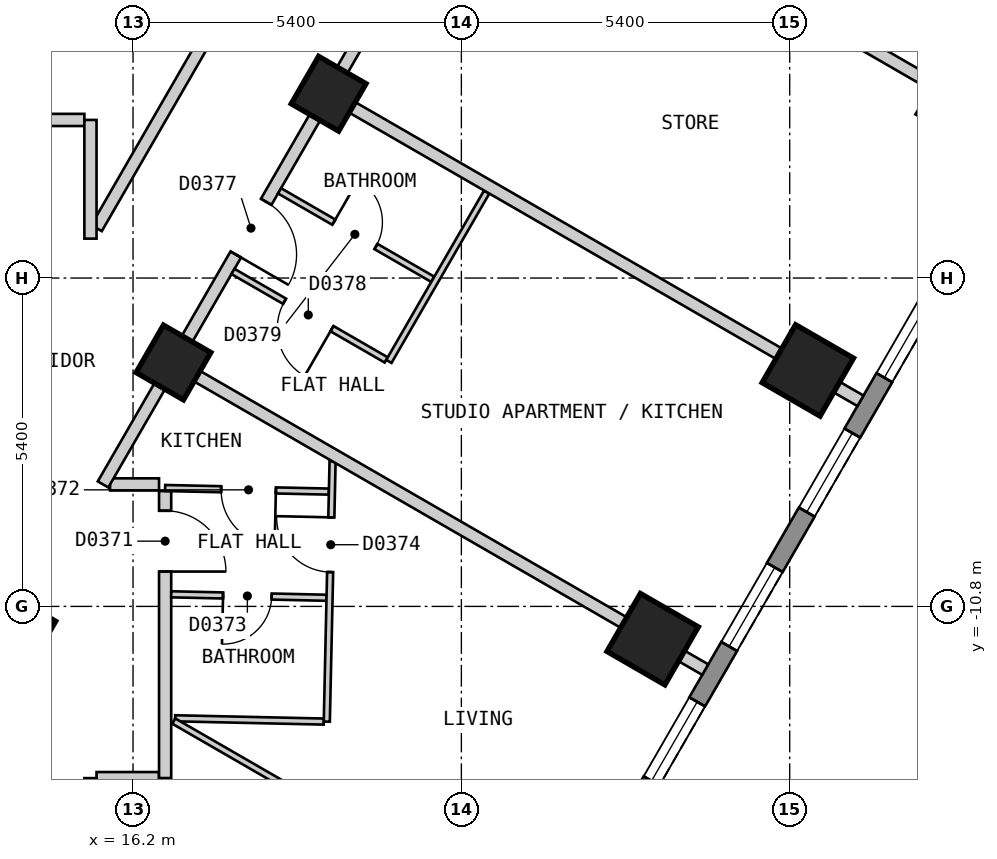
"""IFC4 building model, lengths in metres.
Left out: names, types, materials, properties, quantities, classifications, styles, units other than length and angle.
Written with IfcOpenShell. Run it as: python <this file> out.ifc"""

import sys

from ifc_helpers import new_model, si_unit, direction, frame, frame_2d, origin, origin_2d, place, context, subcontext, project, spatial, polyline, rectangle, outline, extrude, element, fill, save


model = new_model("IFC4")
c1 = context("Model", 3, precision=1e-05, world=origin(), true_north=direction((0.0, 1.0)))
c2 = subcontext(c1, "Body", "Model", "MODEL_VIEW")
j1 = project(units=[si_unit("LENGTHUNIT", "METRE"), si_unit("PLANEANGLEUNIT", "RADIAN")], contexts=[c1])
p1 = place(None, origin())
s1 = spatial("IfcSite", under=j1, at=p1, CompositionType="ELEMENT")
p2 = place(p1, origin())
s2 = spatial("IfcBuilding", under=s1, at=p2, CompositionType="ELEMENT")
p3 = place(p2, frame((0.0, 0.0, 59.4)))
s3 = spatial("IfcBuildingStorey", under=s2, at=p3, CompositionType="ELEMENT", Elevation=59.4)
for number, where, z_axis, x_axis in (
    (1, (24.746, -11.339, 0.0), (0.0, 0.0, 1.0), (0.5, 0.866, 0.0)),
    (2, (27.298, -6.919, 0.0), (0.0, 0.0, 1.0), (0.5, 0.866, 0.0)),
    (3, (29.849, -2.499, 0.0), (0.0, 0.0, 1.0), (0.5, 0.866, 0.0)),
):
    element("IfcColumn", number, at=place(p3, frame(where, z_axis=z_axis, x_axis=x_axis)), inside=s3, PredefinedType="COLUMN", context=c2, shape_type="SweptSolid", body=[
        extrude(rectangle(XDim=1.1, YDim=1.1, at=origin_2d()), origin(), (0.0, 0.0, 1.0), 3.0),
    ])
for number, where, z_axis, x_axis in (
    (4, (14.313, -11.209, 0.0), (0.0, 0.0, 1.0), (0.5, 0.866, 0.0)),
    (5, (16.865, -6.789, 0.0), (0.0, 0.0, 1.0), (0.5, 0.866, 0.0)),
    (6, (19.417, -2.369, 0.0), (0.0, 0.0, 1.0), (0.5, 0.866, 0.0)),
):
    element("IfcColumn", number, at=place(p3, frame(where, z_axis=z_axis, x_axis=x_axis)), inside=s3, PredefinedType="COLUMN", context=c2, shape_type="SweptSolid", body=[
        extrude(rectangle(XDim=0.9, YDim=0.9, at=origin_2d()), origin(), (0.0, 0.0, 1.0), 3.0),
    ])
p4 = place(p3, frame((17.71, -25.825, 0.0), z_axis=(0.0, 0.0, 1.0), x_axis=(0.500001938803, 0.866024284413, 0.0)))
e7 = element("IfcWall", 7, at=p4, inside=s3, PredefinedType="SOLIDWALL", context=c2, shape_type="SweptSolid", body=[
    extrude(outline(polyline([(0.0, -0.15), (27.02, -0.15), (26.94, 0.15), (0.08, 0.15), (0.0, -0.15)])), origin(), (0.0, 0.0, 1.0), 2.6),
])
p5 = place(p4, frame((1.277, 0.0, 0.15)))
e8 = element("IfcOpeningElement", 8, at=p5, cuts=e7, PredefinedType="OPENING", context=c2, shape_type="SweptSolid", body=[
    extrude(rectangle(XDim=1.5, YDim=2.1, at=frame_2d((0.75, 1.05))), frame((0.0, 0.16, 0.0), z_axis=(0.0, -1.0, 0.0), x_axis=(1.0, 0.0, 0.0)), (0.0, 0.0, 1.0), 0.32),
])
p6 = place(p4, frame((3.829, 0.0, 0.15)))
e9 = element("IfcOpeningElement", 9, at=p6, cuts=e7, PredefinedType="OPENING", context=c2, shape_type="SweptSolid", body=[
    extrude(rectangle(XDim=1.5, YDim=2.1, at=frame_2d((0.75, 1.05))), frame((0.0, 0.16, 0.0), z_axis=(0.0, -1.0, 0.0), x_axis=(1.0, 0.0, 0.0)), (0.0, 0.0, 1.0), 0.32),
])
p7 = place(p4, frame((6.382, 0.0, 0.15)))
e10 = element("IfcOpeningElement", 10, at=p7, cuts=e7, PredefinedType="OPENING", context=c2, shape_type="SweptSolid", body=[
    extrude(rectangle(XDim=1.5, YDim=2.1, at=frame_2d((0.75, 1.05))), frame((0.0, 0.16, 0.0), z_axis=(0.0, -1.0, 0.0), x_axis=(1.0, 0.0, 0.0)), (0.0, 0.0, 1.0), 0.32),
])
p8 = place(p4, frame((8.933, 0.0, 0.15)))
e11 = element("IfcOpeningElement", 11, at=p8, cuts=e7, PredefinedType="OPENING", context=c2, shape_type="SweptSolid", body=[
    extrude(rectangle(XDim=1.5, YDim=2.1, at=frame_2d((0.75, 1.05))), frame((0.0, 0.16, 0.0), z_axis=(0.0, -1.0, 0.0), x_axis=(1.0, 0.0, 0.0)), (0.0, 0.0, 1.0), 0.32),
])
p9 = place(p4, frame((11.485, 0.0, 0.15)))
e12 = element("IfcOpeningElement", 12, at=p9, cuts=e7, PredefinedType="OPENING", context=c2, shape_type="SweptSolid", body=[
    extrude(rectangle(XDim=1.5, YDim=2.1, at=frame_2d((0.75, 1.05))), frame((0.0, 0.16, 0.0), z_axis=(0.0, -1.0, 0.0), x_axis=(1.0, 0.0, 0.0)), (0.0, 0.0, 1.0), 0.32),
])
p10 = place(p4, frame((14.037, 0.0, 0.15)))
e13 = element("IfcOpeningElement", 13, at=p10, cuts=e7, PredefinedType="OPENING", context=c2, shape_type="SweptSolid", body=[
    extrude(rectangle(XDim=1.5, YDim=2.1, at=frame_2d((0.75, 1.05))), frame((0.0, 0.16, 0.0), z_axis=(0.0, -1.0, 0.0), x_axis=(1.0, 0.0, 0.0)), (0.0, 0.0, 1.0), 0.32),
])
p11 = place(p4, frame((16.589, 0.0, 0.15)))
e14 = element("IfcOpeningElement", 14, at=p11, cuts=e7, PredefinedType="OPENING", context=c2, shape_type="SweptSolid", body=[
    extrude(rectangle(XDim=1.5, YDim=2.1, at=frame_2d((0.75, 1.05))), frame((0.0, 0.16, 0.0), z_axis=(0.0, -1.0, 0.0), x_axis=(1.0, 0.0, 0.0)), (0.0, 0.0, 1.0), 0.32),
])
p12 = place(p4, frame((19.141, 0.0, 0.15)))
e15 = element("IfcOpeningElement", 15, at=p12, cuts=e7, PredefinedType="OPENING", context=c2, shape_type="SweptSolid", body=[
    extrude(rectangle(XDim=1.5, YDim=2.1, at=frame_2d((0.75, 1.05))), frame((0.0, 0.16, 0.0), z_axis=(0.0, -1.0, 0.0), x_axis=(1.0, 0.0, 0.0)), (0.0, 0.0, 1.0), 0.32),
])
p13 = place(p4, frame((21.693, 0.0, 0.15)))
e16 = element("IfcOpeningElement", 16, at=p13, cuts=e7, PredefinedType="OPENING", context=c2, shape_type="SweptSolid", body=[
    extrude(rectangle(XDim=1.5, YDim=2.1, at=frame_2d((0.75, 1.05))), frame((0.0, 0.16, 0.0), z_axis=(0.0, -1.0, 0.0), x_axis=(1.0, 0.0, 0.0)), (0.0, 0.0, 1.0), 0.32),
])
p14 = place(p4, frame((24.244, 0.0, 0.15)))
e17 = element("IfcOpeningElement", 17, at=p14, cuts=e7, PredefinedType="OPENING", context=c2, shape_type="SweptSolid", body=[
    extrude(rectangle(XDim=1.5, YDim=2.1, at=frame_2d((0.75, 1.05))), frame((0.0, 0.16, 0.0), z_axis=(0.0, -1.0, 0.0), x_axis=(1.0, 0.0, 0.0)), (0.0, 0.0, 1.0), 0.32),
])
p15 = place(p3, frame((15.822, -8.794, 0.0), z_axis=(0.0, 0.0, 1.0), x_axis=(1.0, 0.0, 0.0)))
e18 = element("IfcWall", 18, at=p15, inside=s3, PredefinedType="PARTITIONING", context=c2, shape_type="SweptSolid", body=[
    extrude(rectangle(XDim=0.806, YDim=0.2, at=frame_2d((0.403, 0.0))), origin(), (0.0, 0.0, 1.0), 2.6),
])
p16 = place(p3, frame((15.6, -13.624, 0.0), z_axis=(0.0, 0.0, 1.0), x_axis=(1.0, 0.0, 0.0)))
e19 = element("IfcWall", 19, at=p16, inside=s3, PredefinedType="PARTITIONING", context=c2, shape_type="SweptSolid", body=[
    extrude(rectangle(XDim=1.027, YDim=0.2, at=frame_2d((0.513, 0.0))), origin(), (0.0, 0.0, 1.0), 2.6),
])
p17 = place(p3, frame((7.028, -2.8, 0.0), z_axis=(0.0, 0.0, 1.0), x_axis=(1.0, 0.0, 0.0)))
e20 = element("IfcWall", 20, at=p17, inside=s3, PredefinedType="PARTITIONING", context=c2, shape_type="SweptSolid", body=[
    extrude(rectangle(XDim=8.372, YDim=0.2, at=frame_2d((4.186, 0.0))), origin(), (0.0, 0.0, 1.0), 2.6),
])
p18 = place(p3, frame((15.6, -4.579, 0.0), z_axis=(0.0, 0.0, 1.0), x_axis=(0.499927597274, 0.866067201483, 0.0)))
e21 = element("IfcWall", 21, at=p18, inside=s3, PredefinedType="PARTITIONING", context=c2, shape_type="SweptSolid", body=[
    extrude(rectangle(XDim=5.288, YDim=0.2, at=frame_2d((2.644, 0.0))), origin(), (0.0, 0.0, 1.0), 2.6),
])
p19 = place(p3, frame((15.707, -8.794, 0.0), z_axis=(0.0, 0.0, 1.0), x_axis=(0.500040469623, 0.866002037376, 0.0)))
e22 = element("IfcWall", 22, at=p19, inside=s3, PredefinedType="PARTITIONING", context=c2, shape_type="SweptSolid", body=[
    extrude(rectangle(XDim=2.281, YDim=0.2, at=frame_2d((1.141, 0.0))), origin(), (0.0, 0.0, 1.0), 2.6),
])
p20 = place(p3, frame((16.914, -6.703, 0.0), z_axis=(0.0, 0.0, 1.0), x_axis=(0.50003007663, 0.866008038338, 0.0)))
e23 = element("IfcWall", 23, at=p20, inside=s3, PredefinedType="PARTITIONING", context=c2, shape_type="SweptSolid", body=[
    extrude(rectangle(XDim=7.625, YDim=0.2, at=frame_2d((3.813, 0.0))), origin(), (0.0, 0.0, 1.0), 2.6),
])
p21 = place(p20, frame((1.952, 0.0, 0.0)))
e24 = element("IfcOpeningElement", 24, at=p21, cuts=e23, PredefinedType="OPENING", context=c2, shape_type="SweptSolid", body=[
    extrude(rectangle(XDim=1.0, YDim=2.1, at=frame_2d((0.5, 1.05))), frame((0.0, 0.11, 0.0), z_axis=(0.0, -1.0, 0.0), x_axis=(1.0, 0.0, 0.0)), (0.0, 0.0, 1.0), 0.22),
])
p22 = place(p20, frame((5.987, 0.0, 0.0)))
e25 = element("IfcOpeningElement", 25, at=p22, cuts=e23, PredefinedType="OPENING", context=c2, shape_type="SweptSolid", body=[
    extrude(rectangle(XDim=0.8, YDim=2.1, at=frame_2d((0.4, 1.05))), frame((0.0, 0.11, 0.0), z_axis=(0.0, -1.0, 0.0), x_axis=(1.0, 0.0, 0.0)), (0.0, 0.0, 1.0), 0.22),
])
p23 = place(p3, frame((15.5, -21.199, 0.0), z_axis=(0.0, 0.0, 1.0), x_axis=(0.0, 1.0, 0.0)))
e26 = element("IfcWall", 26, at=p23, inside=s3, PredefinedType="PARTITIONING", context=c2, shape_type="SweptSolid", body=[
    extrude(rectangle(XDim=7.575, YDim=0.2, at=frame_2d((3.788, 0.0))), origin(), (0.0, 0.0, 1.0), 2.6),
])
p24 = place(p23, frame((1.288, 0.0, 0.0)))
e27 = element("IfcOpeningElement", 27, at=p24, cuts=e26, PredefinedType="OPENING", context=c2, shape_type="SweptSolid", body=[
    extrude(rectangle(XDim=0.8, YDim=2.1, at=frame_2d((0.4, 1.05))), frame((0.0, 0.11, 0.0), z_axis=(0.0, -1.0, 0.0), x_axis=(1.0, 0.0, 0.0)), (0.0, 0.0, 1.0), 0.22),
])
p25 = place(p3, frame((15.5, -4.752, 0.0), z_axis=(0.0, 0.0, 1.0), x_axis=(0.0, 1.0, 0.0)))
e28 = element("IfcWall", 28, at=p25, inside=s3, PredefinedType="PARTITIONING", context=c2, shape_type="SweptSolid", body=[
    extrude(rectangle(XDim=1.952, YDim=0.2, at=frame_2d((0.976, 0.0))), origin(), (0.0, 0.0, 1.0), 2.6),
])
p26 = place(p3, frame((16.728, -13.623, 0.0), z_axis=(0.0, 0.0, 1.0), x_axis=(0.0, 1.0, 0.0)))
e29 = element("IfcWall", 29, at=p26, inside=s3, PredefinedType="PARTITIONING", context=c2, shape_type="SweptSolid", body=[
    extrude(rectangle(XDim=4.72, YDim=0.2, at=frame_2d((2.36, 0.0))), origin(), (0.0, 0.0, 1.0), 2.6),
])
p27 = place(p26, frame((3.396, 0.0, 0.0)))
e30 = element("IfcOpeningElement", 30, at=p27, cuts=e29, PredefinedType="OPENING", context=c2, shape_type="SweptSolid", body=[
    extrude(rectangle(XDim=1.0, YDim=2.1, at=frame_2d((0.5, 1.05))), frame((0.0, 0.11, 0.0), z_axis=(0.0, -1.0, 0.0), x_axis=(1.0, 0.0, 0.0)), (0.0, 0.0, 1.0), 0.22),
])
p28 = place(p3, frame((16.728, -8.853, 0.0), z_axis=(0.0, 0.0, 1.0), x_axis=(0.999759401479, -0.02193488442, 0.0)))
e31 = element("IfcWall", 31, at=p28, inside=s3, PredefinedType="PARTITIONING", context=c2, shape_type="SweptSolid", body=[
    extrude(rectangle(XDim=2.694, YDim=0.1, at=frame_2d((1.347, 0.0))), origin(), (0.0, 0.0, 1.0), 2.6),
])
p29 = place(p28, frame((0.922, 0.0, 0.0)))
e32 = element("IfcOpeningElement", 32, at=p29, cuts=e31, PredefinedType="OPENING", context=c2, shape_type="SweptSolid", body=[
    extrude(rectangle(XDim=0.9, YDim=2.1, at=frame_2d((0.45, 1.05))), frame((0.0, 0.06, 0.0), z_axis=(0.0, -1.0, 0.0), x_axis=(1.0, 0.0, 0.0)), (0.0, 0.0, 1.0), 0.12),
])
p30 = place(p3, frame((16.828, -10.601, 0.0), z_axis=(0.0, 0.0, 1.0), x_axis=(0.999752091799, -0.022265555094, 0.0)))
e33 = element("IfcWall", 33, at=p30, inside=s3, PredefinedType="PARTITIONING", context=c2, shape_type="SweptSolid", body=[
    extrude(rectangle(XDim=2.555, YDim=0.1, at=frame_2d((1.277, 0.0))), origin(), (0.0, 0.0, 1.0), 2.6),
])
p31 = place(p30, frame((0.853, 0.0, 0.0)))
e34 = element("IfcOpeningElement", 34, at=p31, cuts=e33, PredefinedType="OPENING", context=c2, shape_type="SweptSolid", body=[
    extrude(rectangle(XDim=0.8, YDim=2.1, at=frame_2d((0.4, 1.05))), frame((0.0, 0.06, 0.0), z_axis=(0.0, -1.0, 0.0), x_axis=(1.0, 0.0, 0.0)), (0.0, 0.0, 1.0), 0.12),
])
p32 = place(p3, frame((16.892, -12.64, 0.0), z_axis=(0.0, 0.0, 1.0), x_axis=(0.999754359069, -0.022163517846, 0.0)))
e35 = element("IfcWall", 35, at=p32, inside=s3, PredefinedType="PARTITIONING", context=c2, shape_type="SweptSolid", body=[
    extrude(rectangle(XDim=2.445, YDim=0.1, at=frame_2d((1.223, 0.0))), origin(), (0.0, 0.0, 1.0), 2.6),
])
p33 = place(p3, frame((16.87, -12.686, 0.0), z_axis=(0.0, 0.0, 1.0), x_axis=(0.866071826058, -0.499919585642, 0.0)))
e36 = element("IfcWall", 36, at=p33, inside=s3, PredefinedType="PARTITIONING", context=c2, shape_type="SweptSolid", body=[
    extrude(rectangle(XDim=7.147, YDim=0.1, at=frame_2d((3.574, 0.0))), origin(), (0.0, 0.0, 1.0), 2.6),
])
p34 = place(p33, frame((4.558, 0.0, 0.0)))
e37 = element("IfcOpeningElement", 37, at=p34, cuts=e36, PredefinedType="OPENING", context=c2, shape_type="SweptSolid", body=[
    extrude(rectangle(XDim=0.9, YDim=2.1, at=frame_2d((0.45, 1.05))), frame((0.0, 0.06, 0.0), z_axis=(0.0, -1.0, 0.0), x_axis=(1.0, 0.0, 0.0)), (0.0, 0.0, 1.0), 0.12),
])
p35 = place(p3, frame((17.844, -5.292, 0.0), z_axis=(0.0, 0.0, 1.0), x_axis=(0.866003949776, -0.500037157592, 0.0)))
e38 = element("IfcWall", 38, at=p35, inside=s3, PredefinedType="PARTITIONING", context=c2, shape_type="SweptSolid", body=[
    extrude(rectangle(XDim=2.91, YDim=0.1, at=frame_2d((1.455, 0.0))), origin(), (0.0, 0.0, 1.0), 2.6),
])
p36 = place(p35, frame((0.98, 0.0, 0.0)))
e39 = element("IfcOpeningElement", 39, at=p36, cuts=e38, PredefinedType="OPENING", context=c2, shape_type="SweptSolid", body=[
    extrude(rectangle(XDim=0.9, YDim=2.1, at=frame_2d((0.45, 1.05))), frame((0.0, 0.06, 0.0), z_axis=(0.0, -1.0, 0.0), x_axis=(1.0, 0.0, 0.0)), (0.0, 0.0, 1.0), 0.12),
])
p37 = place(p3, frame((18.61, -3.966, 0.0), z_axis=(0.0, 0.0, 1.0), x_axis=(0.866019304365, -0.500010564355, 0.0)))
e40 = element("IfcWall", 40, at=p37, inside=s3, PredefinedType="PARTITIONING", context=c2, shape_type="SweptSolid", body=[
    extrude(rectangle(XDim=2.91, YDim=0.1, at=frame_2d((1.455, 0.0))), origin(), (0.0, 0.0, 1.0), 2.6),
])
p38 = place(p37, frame((1.03, 0.0, 0.0)))
e41 = element("IfcOpeningElement", 41, at=p38, cuts=e40, PredefinedType="OPENING", context=c2, shape_type="SweptSolid", body=[
    extrude(rectangle(XDim=0.8, YDim=2.1, at=frame_2d((0.4, 1.05))), frame((0.0, 0.06, 0.0), z_axis=(0.0, -1.0, 0.0), x_axis=(1.0, 0.0, 0.0)), (0.0, 0.0, 1.0), 0.12),
])
p39 = place(p3, frame((20.408, -6.771, 0.0), z_axis=(0.0, 0.0, 1.0), x_axis=(0.500197891286, 0.865911121047, 0.0)))
e42 = element("IfcWall", 42, at=p39, inside=s3, PredefinedType="PARTITIONING", context=c2, shape_type="SweptSolid", body=[
    extrude(rectangle(XDim=3.215, YDim=0.1, at=frame_2d((1.607, 0.0))), origin(), (0.0, 0.0, 1.0), 2.6),
])
p40 = place(p3, frame((19.387, -12.695, 0.0), z_axis=(0.0, 0.0, 1.0), x_axis=(0.022188864436, 0.99975379684, 0.0)))
e43 = element("IfcWall", 43, at=p40, inside=s3, PredefinedType="PARTITIONING", context=c2, shape_type="SweptSolid", body=[
    extrude(rectangle(XDim=4.28, YDim=0.1, at=frame_2d((2.14, 0.0))), origin(), (0.0, 0.0, 1.0), 2.6),
])
p41 = place(p40, frame((2.46, 0.0, 0.0)))
e44 = element("IfcOpeningElement", 44, at=p41, cuts=e43, PredefinedType="OPENING", context=c2, shape_type="SweptSolid", body=[
    extrude(rectangle(XDim=0.9, YDim=2.1, at=frame_2d((0.45, 1.05))), frame((0.0, 0.06, 0.0), z_axis=(0.0, -1.0, 0.0), x_axis=(1.0, 0.0, 0.0)), (0.0, 0.0, 1.0), 0.12),
])
p42 = place(p3, frame((19.503, -2.419, 0.0), z_axis=(0.0, 0.0, 1.0), x_axis=(0.866047370643, -0.499961950354, 0.0)))
e45 = element("IfcWall", 45, at=p42, inside=s3, PredefinedType="PARTITIONING", context=c2, shape_type="SweptSolid", body=[
    extrude(rectangle(XDim=10.001, YDim=0.2, at=frame_2d((5.0, 0.0))), origin(), (0.0, 0.0, 1.0), 2.6),
])
p43 = place(p3, frame((25.693, -0.099, 0.0), z_axis=(0.0, 0.0, 1.0), x_axis=(0.866032775405, -0.499987231761, 0.0)))
e46 = element("IfcWall", 46, at=p43, inside=s3, PredefinedType="PARTITIONING", context=c2, shape_type="SweptSolid", body=[
    extrude(rectangle(XDim=5.8, YDim=0.2, at=frame_2d((2.9, 0.0))), origin(), (0.0, 0.0, 1.0), 2.6),
])
p44 = place(p3, frame((16.916, -6.819, 0.0), z_axis=(0.0, 0.0, 1.0), x_axis=(0.866028876723, -0.499993984646, 0.0)))
e47 = element("IfcWall", 47, at=p44, inside=s3, PredefinedType="PARTITIONING", context=c2, shape_type="SweptSolid", body=[
    extrude(rectangle(XDim=10.04, YDim=0.2, at=frame_2d((5.02, 0.0))), origin(), (0.0, 0.0, 1.0), 2.6),
])
p45 = place(p10, origin())
e48 = element("IfcWindow", 48, at=p45, inside=s3, PartitioningType="SINGLE_PANEL", PredefinedType="WINDOW", context=c2, shape_type="SweptSolid", body=[
    extrude(rectangle(XDim=1.5, YDim=2.1, at=frame_2d((0.75, 1.05))), frame((0.0, 0.03, 0.0), z_axis=(0.0, -1.0, 0.0), x_axis=(1.0, 0.0, 0.0)), (0.0, 0.0, 1.0), 0.06),
])
fill(e13, e48)
p46 = place(p11, origin())
e49 = element("IfcWindow", 49, at=p46, inside=s3, PartitioningType="SINGLE_PANEL", PredefinedType="WINDOW", context=c2, shape_type="SweptSolid", body=[
    extrude(rectangle(XDim=1.5, YDim=2.1, at=frame_2d((0.75, 1.05))), frame((0.0, 0.03, 0.0), z_axis=(0.0, -1.0, 0.0), x_axis=(1.0, 0.0, 0.0)), (0.0, 0.0, 1.0), 0.06),
])
fill(e14, e49)
p47 = place(p12, origin())
e50 = element("IfcWindow", 50, at=p47, inside=s3, PartitioningType="SINGLE_PANEL", PredefinedType="WINDOW", context=c2, shape_type="SweptSolid", body=[
    extrude(rectangle(XDim=1.5, YDim=2.1, at=frame_2d((0.75, 1.05))), frame((0.0, 0.03, 0.0), z_axis=(0.0, -1.0, 0.0), x_axis=(1.0, 0.0, 0.0)), (0.0, 0.0, 1.0), 0.06),
])
fill(e15, e50)
p48 = place(p13, origin())
e51 = element("IfcWindow", 51, at=p48, inside=s3, PartitioningType="SINGLE_PANEL", PredefinedType="WINDOW", context=c2, shape_type="SweptSolid", body=[
    extrude(rectangle(XDim=1.5, YDim=2.1, at=frame_2d((0.75, 1.05))), frame((0.0, 0.03, 0.0), z_axis=(0.0, -1.0, 0.0), x_axis=(1.0, 0.0, 0.0)), (0.0, 0.0, 1.0), 0.06),
])
fill(e16, e51)
p49 = place(p27, origin())
e52 = element("IfcDoor", 52, at=p49, inside=s3, OperationType="SINGLE_SWING_LEFT", PredefinedType="DOOR", context=c2, shape_type="SweptSolid", body=[
    extrude(rectangle(XDim=1.0, YDim=2.1, at=frame_2d((0.5, 1.05))), frame((0.0, 0.025, 0.0), z_axis=(0.0, -1.0, 0.0), x_axis=(1.0, 0.0, 0.0)), (0.0, 0.0, 1.0), 0.05),
])
fill(e30, e52)
p50 = place(p29, origin())
e53 = element("IfcDoor", 53, at=p50, inside=s3, OperationType="SINGLE_SWING_RIGHT", PredefinedType="DOOR", context=c2, shape_type="SweptSolid", body=[
    extrude(rectangle(XDim=0.9, YDim=2.1, at=frame_2d((0.45, 1.05))), frame((0.0, 0.025, 0.0), z_axis=(0.0, -1.0, 0.0), x_axis=(1.0, 0.0, 0.0)), (0.0, 0.0, 1.0), 0.05),
])
fill(e32, e53)
p51 = place(p31, origin())
e54 = element("IfcDoor", 54, at=p51, inside=s3, OperationType="SINGLE_SWING_LEFT", PredefinedType="DOOR", context=c2, shape_type="SweptSolid", body=[
    extrude(rectangle(XDim=0.8, YDim=2.1, at=frame_2d((0.4, 1.05))), frame((0.0, 0.025, 0.0), z_axis=(0.0, -1.0, 0.0), x_axis=(1.0, 0.0, 0.0)), (0.0, 0.0, 1.0), 0.05),
])
fill(e34, e54)
p52 = place(p41, origin())
e55 = element("IfcDoor", 55, at=p52, inside=s3, OperationType="SINGLE_SWING_RIGHT", PredefinedType="DOOR", context=c2, shape_type="SweptSolid", body=[
    extrude(rectangle(XDim=0.9, YDim=2.1, at=frame_2d((0.45, 1.05))), frame((0.0, 0.025, 0.0), z_axis=(0.0, -1.0, 0.0), x_axis=(1.0, 0.0, 0.0)), (0.0, 0.0, 1.0), 0.05),
])
fill(e44, e55)
p53 = place(p21, origin())
e56 = element("IfcDoor", 56, at=p53, inside=s3, OperationType="SINGLE_SWING_LEFT", PredefinedType="DOOR", context=c2, shape_type="SweptSolid", body=[
    extrude(rectangle(XDim=1.0, YDim=2.1, at=frame_2d((0.5, 1.05))), frame((0.0, 0.025, 0.0), z_axis=(0.0, -1.0, 0.0), x_axis=(1.0, 0.0, 0.0)), (0.0, 0.0, 1.0), 0.05),
])
fill(e24, e56)
p54 = place(p36, origin())
e57 = element("IfcDoor", 57, at=p54, inside=s3, OperationType="SINGLE_SWING_RIGHT", PredefinedType="DOOR", context=c2, shape_type="SweptSolid", body=[
    extrude(rectangle(XDim=0.9, YDim=2.1, at=frame_2d((0.45, 1.05))), frame((0.0, 0.025, 0.0), z_axis=(0.0, -1.0, 0.0), x_axis=(1.0, 0.0, 0.0)), (0.0, 0.0, 1.0), 0.05),
])
fill(e39, e57)
p55 = place(p38, origin())
e58 = element("IfcDoor", 58, at=p55, inside=s3, OperationType="SINGLE_SWING_LEFT", PredefinedType="DOOR", context=c2, shape_type="SweptSolid", body=[
    extrude(rectangle(XDim=0.8, YDim=2.1, at=frame_2d((0.4, 1.05))), frame((0.0, 0.025, 0.0), z_axis=(0.0, -1.0, 0.0), x_axis=(1.0, 0.0, 0.0)), (0.0, 0.0, 1.0), 0.05),
])
fill(e41, e58)
save(model, sys.argv[1])
